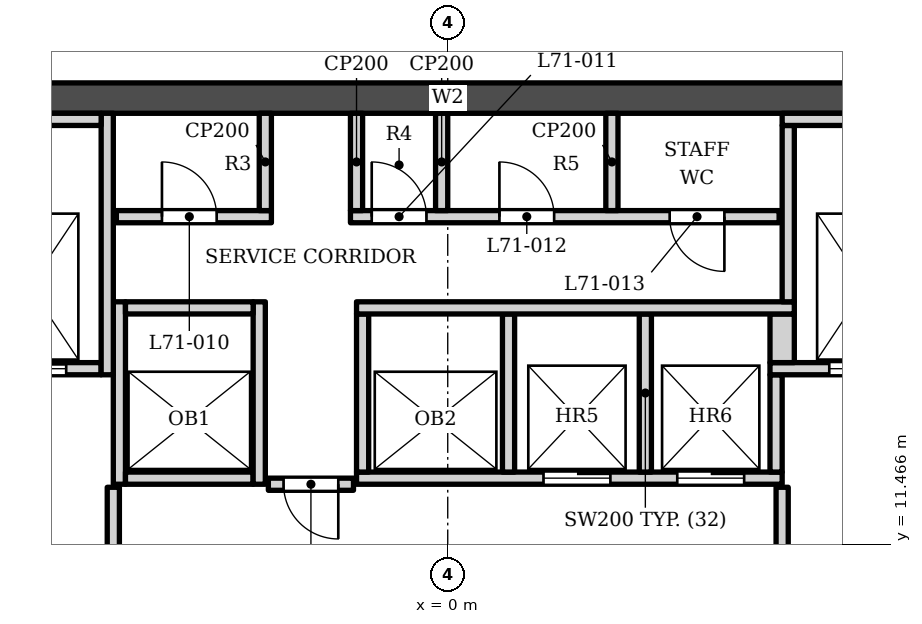
"""IFC4 building model, lengths in metres.
Left out: names, types, materials, properties, quantities, classifications, styles, units other than length and angle.
Written with IfcOpenShell. Run it as: python <this file> out.ifc"""

import sys

from ifc_helpers import new_model, si_unit, direction, frame, frame_2d, origin, place, context, subcontext, project, spatial, rectangle, extrude, element, fill, save


model = new_model("IFC4")
c1 = context("Model", 3, precision=1e-05, world=origin(), true_north=direction((0.0, 1.0)))
c2 = subcontext(c1, "Body", "Model", "MODEL_VIEW")
j1 = project(units=[si_unit("LENGTHUNIT", "METRE"), si_unit("PLANEANGLEUNIT", "RADIAN")], contexts=[c1])
p1 = place(None, origin())
s1 = spatial("IfcSite", under=j1, at=p1, CompositionType="ELEMENT")
p2 = place(p1, origin())
s2 = spatial("IfcBuilding", under=s1, at=p2, CompositionType="ELEMENT")
p3 = place(p2, frame((0.0, 0.0, 295.0)))
s3 = spatial("IfcBuildingStorey", under=s2, at=p3, CompositionType="ELEMENT", Elevation=295.0)
p4 = place(p3, frame((-12.1, 18.802, 0.0), z_axis=(0.0, 0.0, 1.0), x_axis=(1.0, 0.0, 0.0)))
e1 = element("IfcWall", 1, at=p4, inside=s3, PredefinedType="SHEAR", context=c2, shape_type="SweptSolid", body=[
    extrude(rectangle(XDim=24.2, YDim=0.5, at=frame_2d((12.1, 0.0))), origin(), (0.0, 0.0, 1.0), 7.5),
])
p5 = place(p3, frame((-5.5, 9.103, 0.0), z_axis=(0.0, 0.0, 1.0), x_axis=(0.0, 1.0, 0.0)))
e2 = element("IfcWall", 2, at=p5, inside=s3, PredefinedType="SOLIDWALL", context=c2, shape_type="SweptSolid", body=[
    extrude(rectangle(XDim=3.3, YDim=0.2, at=frame_2d((1.65, 0.0))), origin(), (0.0, 0.0, 1.0), 7.2),
])
p6 = place(p5, frame((0.85, 0.0, 0.0)))
e3 = element("IfcOpeningElement", 3, at=p6, cuts=e2, PredefinedType="OPENING", context=c2, shape_type="SweptSolid", body=[
    extrude(rectangle(XDim=1.4, YDim=2.1, at=frame_2d((0.7, 1.05))), frame((0.0, 0.11, 0.0), z_axis=(0.0, -1.0, 0.0), x_axis=(1.0, 0.0, 0.0)), (0.0, 0.0, 1.0), 0.22),
])
p7 = place(p3, frame((5.5, 9.103, 0.0), z_axis=(0.0, 0.0, 1.0), x_axis=(0.0, 1.0, 0.0)))
e4 = element("IfcWall", 4, at=p7, inside=s3, PredefinedType="SOLIDWALL", context=c2, shape_type="SweptSolid", body=[
    extrude(rectangle(XDim=3.3, YDim=0.2, at=frame_2d((1.65, 0.0))), origin(), (0.0, 0.0, 1.0), 7.2),
])
p8 = place(p7, frame((0.85, 0.0, 0.0)))
e5 = element("IfcOpeningElement", 5, at=p8, cuts=e4, PredefinedType="OPENING", context=c2, shape_type="SweptSolid", body=[
    extrude(rectangle(XDim=1.4, YDim=2.1, at=frame_2d((0.7, 1.05))), frame((0.0, 0.11, 0.0), z_axis=(0.0, -1.0, 0.0), x_axis=(1.0, 0.0, 0.0)), (0.0, 0.0, 1.0), 0.22),
])
p9 = place(p3, frame((-2.95, 12.453, 0.0), z_axis=(0.0, 0.0, 1.0), x_axis=(1.0, 0.0, 0.0)))
e6 = element("IfcWall", 6, at=p9, inside=s3, PredefinedType="SOLIDWALL", context=c2, shape_type="SweptSolid", body=[
    extrude(rectangle(XDim=1.4, YDim=0.2, at=frame_2d((0.7, 0.0))), origin(), (0.0, 0.0, 1.0), 7.2),
])
p10 = place(p9, frame((0.25, 0.0, 0.0)))
e7 = element("IfcOpeningElement", 7, at=p10, cuts=e6, PredefinedType="OPENING", context=c2, shape_type="SweptSolid", body=[
    extrude(rectangle(XDim=0.9, YDim=2.1, at=frame_2d((0.45, 1.05))), frame((0.0, 0.11, 0.0), z_axis=(0.0, -1.0, 0.0), x_axis=(1.0, 0.0, 0.0)), (0.0, 0.0, 1.0), 0.22),
])
p11 = place(p3, frame((-5.4, 12.453, 0.0), z_axis=(0.0, 0.0, 1.0), x_axis=(0.0, 1.0, 0.0)))
e8 = element("IfcWall", 8, at=p11, inside=s3, PredefinedType="SOLIDWALL", context=c2, shape_type="SweptSolid", body=[
    extrude(rectangle(XDim=3.0, YDim=0.2, at=frame_2d((1.5, 0.0))), origin(), (0.0, 0.0, 1.0), 7.2),
])
p12 = place(p3, frame((-5.3, 12.552, 0.0), z_axis=(0.0, 0.0, 1.0), x_axis=(1.0, 0.0, 0.0)))
e9 = element("IfcWall", 9, at=p12, inside=s3, PredefinedType="SOLIDWALL", context=c2, shape_type="SweptSolid", body=[
    extrude(rectangle(XDim=2.1, YDim=0.2, at=frame_2d((1.05, 0.0))), origin(), (0.0, 0.0, 1.0), 7.2),
])
p13 = place(p3, frame((-3.1, 12.453, 0.0), z_axis=(0.0, 0.0, 1.0), x_axis=(0.0, 1.0, 0.0)))
e10 = element("IfcWall", 10, at=p13, inside=s3, PredefinedType="SOLIDWALL", context=c2, shape_type="SweptSolid", body=[
    extrude(rectangle(XDim=3.0, YDim=0.2, at=frame_2d((1.5, 0.0))), origin(), (0.0, 0.0, 1.0), 7.2),
])
p14 = place(p3, frame((-1.5, 12.552, 0.0), z_axis=(0.0, 0.0, 1.0), x_axis=(1.0, 0.0, 0.0)))
e11 = element("IfcWall", 11, at=p14, inside=s3, PredefinedType="SOLIDWALL", context=c2, shape_type="SweptSolid", body=[
    extrude(rectangle(XDim=7.0, YDim=0.2, at=frame_2d((3.5, 0.0))), origin(), (0.0, 0.0, 1.0), 7.2),
])
p15 = place(p14, frame((3.075, 0.0, 0.0)))
e12 = element("IfcOpeningElement", 12, at=p15, cuts=e11, PredefinedType="OPENING", context=c2, shape_type="SweptSolid", body=[
    extrude(rectangle(XDim=1.1, YDim=2.1, at=frame_2d((0.55, 1.05))), frame((0.0, 0.11, 0.0), z_axis=(0.0, -1.0, 0.0), x_axis=(1.0, 0.0, 0.0)), (0.0, 0.0, 1.0), 0.22),
])
p16 = place(p14, frame((5.275, 0.0, 0.0)))
e13 = element("IfcOpeningElement", 13, at=p16, cuts=e11, PredefinedType="OPENING", context=c2, shape_type="SweptSolid", body=[
    extrude(rectangle(XDim=1.1, YDim=2.1, at=frame_2d((0.55, 1.05))), frame((0.0, 0.11, 0.0), z_axis=(0.0, -1.0, 0.0), x_axis=(1.0, 0.0, 0.0)), (0.0, 0.0, 1.0), 0.22),
])
for number, where, z_axis, x_axis in (
    (14, (-1.4, 12.653, 0.0), (0.0, 0.0, 1.0), (0.0, 1.0, 0.0)),
    (15, (1.0, 12.653, 0.0), (0.0, 0.0, 1.0), (0.0, 1.0, 0.0)),
    (16, (3.25, 12.653, 0.0), (0.0, 0.0, 1.0), (0.0, 1.0, 0.0)),
):
    element("IfcWall", number, at=place(p3, frame(where, z_axis=z_axis, x_axis=x_axis)), inside=s3, PredefinedType="SOLIDWALL", context=c2, shape_type="SweptSolid", body=[
        extrude(rectangle(XDim=2.6, YDim=0.2, at=frame_2d((1.3, 0.0))), origin(), (0.0, 0.0, 1.0), 7.2),
    ])
p17 = place(p3, frame((5.4, 12.653, 0.0), z_axis=(0.0, 0.0, 1.0), x_axis=(0.0, 1.0, 0.0)))
e17 = element("IfcWall", 17, at=p17, inside=s3, PredefinedType="SOLIDWALL", context=c2, shape_type="SweptSolid", body=[
    extrude(rectangle(XDim=1.6, YDim=0.2, at=frame_2d((0.8, 0.0))), origin(), (0.0, 0.0, 1.0), 7.2),
])
p18 = place(p3, frame((-8.05, 14.353, 0.0), z_axis=(0.0, 0.0, 1.0), x_axis=(1.0, 0.0, 0.0)))
e18 = element("IfcWall", 18, at=p18, inside=s3, PredefinedType="SOLIDWALL", context=c2, shape_type="SweptSolid", body=[
    extrude(rectangle(XDim=2.35, YDim=0.2, at=frame_2d((1.175, 0.0))), origin(), (0.0, 0.0, 1.0), 7.2),
])
p19 = place(p18, frame((0.575, 0.0, 0.0)))
e19 = element("IfcOpeningElement", 19, at=p19, cuts=e18, PredefinedType="OPENING", context=c2, shape_type="SweptSolid", body=[
    extrude(rectangle(XDim=1.2, YDim=2.1, at=frame_2d((0.6, 1.05))), frame((0.0, 0.11, 0.0), z_axis=(0.0, -1.0, 0.0), x_axis=(1.0, 0.0, 0.0)), (0.0, 0.0, 1.0), 0.22),
])
p20 = place(p3, frame((-5.6, 14.253, 0.0), z_axis=(0.0, 0.0, 1.0), x_axis=(0.0, 1.0, 0.0)))
e20 = element("IfcWall", 20, at=p20, inside=s3, PredefinedType="SOLIDWALL", context=c2, shape_type="SweptSolid", body=[
    extrude(rectangle(XDim=4.3, YDim=0.2, at=frame_2d((2.15, 0.0))), origin(), (0.0, 0.0, 1.0), 7.2),
])
p21 = place(p3, frame((5.3, 14.353, 0.0), z_axis=(0.0, 0.0, 1.0), x_axis=(1.0, 0.0, 0.0)))
e21 = element("IfcWall", 21, at=p21, inside=s3, PredefinedType="SOLIDWALL", context=c2, shape_type="SweptSolid", body=[
    extrude(rectangle(XDim=2.75, YDim=0.2, at=frame_2d((1.375, 0.0))), origin(), (0.0, 0.0, 1.0), 7.2),
])
p22 = place(p21, frame((0.975, 0.0, 0.0)))
e22 = element("IfcOpeningElement", 22, at=p22, cuts=e21, PredefinedType="OPENING", context=c2, shape_type="SweptSolid", body=[
    extrude(rectangle(XDim=1.2, YDim=2.1, at=frame_2d((0.6, 1.05))), frame((0.0, 0.11, 0.0), z_axis=(0.0, -1.0, 0.0), x_axis=(1.0, 0.0, 0.0)), (0.0, 0.0, 1.0), 0.22),
])
p23 = place(p3, frame((5.5, 14.453, 0.0), z_axis=(0.0, 0.0, 1.0), x_axis=(0.0, 1.0, 0.0)))
e23 = element("IfcWall", 23, at=p23, inside=s3, PredefinedType="SOLIDWALL", context=c2, shape_type="SweptSolid", body=[
    extrude(rectangle(XDim=0.8, YDim=0.4, at=frame_2d((0.4, 0.0))), origin(), (0.0, 0.0, 1.0), 7.2),
])
p24 = place(p3, frame((-5.3, 15.353, 0.0), z_axis=(0.0, 0.0, 1.0), x_axis=(1.0, 0.0, 0.0)))
e24 = element("IfcWall", 24, at=p24, inside=s3, PredefinedType="SOLIDWALL", context=c2, shape_type="SweptSolid", body=[
    extrude(rectangle(XDim=2.1, YDim=0.2, at=frame_2d((1.05, 0.0))), origin(), (0.0, 0.0, 1.0), 7.2),
])
p25 = place(p3, frame((-1.5, 15.353, 0.0), z_axis=(0.0, 0.0, 1.0), x_axis=(1.0, 0.0, 0.0)))
e25 = element("IfcWall", 25, at=p25, inside=s3, PredefinedType="SOLIDWALL", context=c2, shape_type="SweptSolid", body=[
    extrude(rectangle(XDim=7.2, YDim=0.2, at=frame_2d((3.6, 0.0))), origin(), (0.0, 0.0, 1.0), 7.2),
])
p26 = place(p3, frame((5.6, 15.453, 0.0), z_axis=(0.0, 0.0, 1.0), x_axis=(0.0, 1.0, 0.0)))
e26 = element("IfcWall", 26, at=p26, inside=s3, PredefinedType="SOLIDWALL", context=c2, shape_type="SweptSolid", body=[
    extrude(rectangle(XDim=2.9, YDim=0.2, at=frame_2d((1.45, 0.0))), origin(), (0.0, 0.0, 1.0), 7.2),
])
p27 = place(p3, frame((-5.45, 16.853, 0.0), z_axis=(0.0, 0.0, 1.0), x_axis=(1.0, 0.0, 0.0)))
e27 = element("IfcWall", 27, at=p27, inside=s3, PredefinedType="SOLIDWALL", context=c2, shape_type="SweptSolid", body=[
    extrude(rectangle(XDim=2.55, YDim=0.2, at=frame_2d((1.275, 0.0))), origin(), (0.0, 0.0, 1.0), 7.2),
])
p28 = place(p27, frame((0.75, 0.0, 0.0)))
e28 = element("IfcOpeningElement", 28, at=p28, cuts=e27, PredefinedType="OPENING", context=c2, shape_type="SweptSolid", body=[
    extrude(rectangle(XDim=0.9, YDim=2.1, at=frame_2d((0.45, 1.05))), frame((0.0, 0.11, 0.0), z_axis=(0.0, -1.0, 0.0), x_axis=(1.0, 0.0, 0.0)), (0.0, 0.0, 1.0), 0.22),
])
p29 = place(p3, frame((-1.6, 16.853, 0.0), z_axis=(0.0, 0.0, 1.0), x_axis=(1.0, 0.0, 0.0)))
e29 = element("IfcWall", 29, at=p29, inside=s3, PredefinedType="SOLIDWALL", context=c2, shape_type="SweptSolid", body=[
    extrude(rectangle(XDim=7.05, YDim=0.2, at=frame_2d((3.525, 0.0))), origin(), (0.0, 0.0, 1.0), 7.2),
])
p30 = place(p29, frame((0.35, 0.0, 0.0)))
e30 = element("IfcOpeningElement", 30, at=p30, cuts=e29, PredefinedType="OPENING", context=c2, shape_type="SweptSolid", body=[
    extrude(rectangle(XDim=0.9, YDim=2.1, at=frame_2d((0.45, 1.05))), frame((0.0, 0.11, 0.0), z_axis=(0.0, -1.0, 0.0), x_axis=(1.0, 0.0, 0.0)), (0.0, 0.0, 1.0), 0.22),
])
p31 = place(p29, frame((2.45, 0.0, 0.0)))
e31 = element("IfcOpeningElement", 31, at=p31, cuts=e29, PredefinedType="OPENING", context=c2, shape_type="SweptSolid", body=[
    extrude(rectangle(XDim=0.9, YDim=2.1, at=frame_2d((0.45, 1.05))), frame((0.0, 0.11, 0.0), z_axis=(0.0, -1.0, 0.0), x_axis=(1.0, 0.0, 0.0)), (0.0, 0.0, 1.0), 0.22),
])
p32 = place(p29, frame((5.25, 0.0, 0.0)))
e32 = element("IfcOpeningElement", 32, at=p32, cuts=e29, PredefinedType="OPENING", context=c2, shape_type="SweptSolid", body=[
    extrude(rectangle(XDim=0.9, YDim=2.1, at=frame_2d((0.45, 1.05))), frame((0.0, 0.11, 0.0), z_axis=(0.0, -1.0, 0.0), x_axis=(1.0, 0.0, 0.0)), (0.0, 0.0, 1.0), 0.22),
])
for number, where, z_axis, x_axis in (
    (33, (-3.0, 16.953, 0.0), (0.0, 0.0, 1.0), (0.0, 1.0, 0.0)),
    (34, (-1.5, 16.953, 0.0), (0.0, 0.0, 1.0), (0.0, 1.0, 0.0)),
    (35, (-0.1, 16.953, 0.0), (0.0, 0.0, 1.0), (0.0, 1.0, 0.0)),
    (36, (2.7, 16.953, 0.0), (0.0, 0.0, 1.0), (0.0, 1.0, 0.0)),
):
    element("IfcWall", number, at=place(p3, frame(where, z_axis=z_axis, x_axis=x_axis)), inside=s3, PredefinedType="PARTITIONING", context=c2, shape_type="SweptSolid", body=[
        extrude(rectangle(XDim=1.6, YDim=0.2, at=frame_2d((0.8, 0.0))), origin(), (0.0, 0.0, 1.0), 7.2),
    ])
p33 = place(p3, frame((-8.05, 18.453, 0.0), z_axis=(0.0, 0.0, 1.0), x_axis=(1.0, 0.0, 0.0)))
e37 = element("IfcWall", 37, at=p33, inside=s3, PredefinedType="SOLIDWALL", context=c2, shape_type="SweptSolid", body=[
    extrude(rectangle(XDim=2.35, YDim=0.2, at=frame_2d((1.175, 0.0))), origin(), (0.0, 0.0, 1.0), 7.2),
])
p34 = place(p3, frame((5.5, 18.453, 0.0), z_axis=(0.0, 0.0, 1.0), x_axis=(1.0, 0.0, 0.0)))
e38 = element("IfcWall", 38, at=p34, inside=s3, PredefinedType="SOLIDWALL", context=c2, shape_type="SweptSolid", body=[
    extrude(rectangle(XDim=2.55, YDim=0.2, at=frame_2d((1.275, 0.0))), origin(), (0.0, 0.0, 1.0), 7.2),
])
p35 = place(p15, origin())
e39 = element("IfcDoor", 39, at=p35, inside=s3, OperationType="DOUBLE_DOOR_SLIDING", PredefinedType="DOOR", context=c2, shape_type="SweptSolid", body=[
    extrude(rectangle(XDim=1.1, YDim=2.1, at=frame_2d((0.55, 1.05))), frame((0.0, 0.025, 0.0), z_axis=(0.0, -1.0, 0.0), x_axis=(1.0, 0.0, 0.0)), (0.0, 0.0, 1.0), 0.05),
])
fill(e12, e39)
p36 = place(p16, origin())
e40 = element("IfcDoor", 40, at=p36, inside=s3, OperationType="DOUBLE_DOOR_SLIDING", PredefinedType="DOOR", context=c2, shape_type="SweptSolid", body=[
    extrude(rectangle(XDim=1.1, YDim=2.1, at=frame_2d((0.55, 1.05))), frame((0.0, 0.025, 0.0), z_axis=(0.0, -1.0, 0.0), x_axis=(1.0, 0.0, 0.0)), (0.0, 0.0, 1.0), 0.05),
])
fill(e13, e40)
p37 = place(p19, origin())
e41 = element("IfcDoor", 41, at=p37, inside=s3, OperationType="DOUBLE_DOOR_SLIDING", PredefinedType="DOOR", context=c2, shape_type="SweptSolid", body=[
    extrude(rectangle(XDim=1.2, YDim=2.1, at=frame_2d((0.6, 1.05))), frame((0.0, 0.025, 0.0), z_axis=(0.0, -1.0, 0.0), x_axis=(1.0, 0.0, 0.0)), (0.0, 0.0, 1.0), 0.05),
])
fill(e19, e41)
p38 = place(p22, origin())
e42 = element("IfcDoor", 42, at=p38, inside=s3, OperationType="DOUBLE_DOOR_SLIDING", PredefinedType="DOOR", context=c2, shape_type="SweptSolid", body=[
    extrude(rectangle(XDim=1.2, YDim=2.1, at=frame_2d((0.6, 1.05))), frame((0.0, 0.025, 0.0), z_axis=(0.0, -1.0, 0.0), x_axis=(1.0, 0.0, 0.0)), (0.0, 0.0, 1.0), 0.05),
])
fill(e22, e42)
p39 = place(p10, origin())
e43 = element("IfcDoor", 43, at=p39, inside=s3, OperationType="SINGLE_SWING_RIGHT", PredefinedType="DOOR", context=c2, shape_type="SweptSolid", body=[
    extrude(rectangle(XDim=0.9, YDim=2.1, at=frame_2d((0.45, 1.05))), frame((0.0, 0.025, 0.0), z_axis=(0.0, -1.0, 0.0), x_axis=(1.0, 0.0, 0.0)), (0.0, 0.0, 1.0), 0.05),
])
fill(e7, e43)
p40 = place(p28, origin())
e44 = element("IfcDoor", 44, at=p40, inside=s3, OperationType="SINGLE_SWING_LEFT", PredefinedType="DOOR", context=c2, shape_type="SweptSolid", body=[
    extrude(rectangle(XDim=0.9, YDim=2.1, at=frame_2d((0.45, 1.05))), frame((0.0, 0.025, 0.0), z_axis=(0.0, -1.0, 0.0), x_axis=(1.0, 0.0, 0.0)), (0.0, 0.0, 1.0), 0.05),
])
fill(e28, e44)
p41 = place(p30, origin())
e45 = element("IfcDoor", 45, at=p41, inside=s3, OperationType="SINGLE_SWING_LEFT", PredefinedType="DOOR", context=c2, shape_type="SweptSolid", body=[
    extrude(rectangle(XDim=0.9, YDim=2.1, at=frame_2d((0.45, 1.05))), frame((0.0, 0.025, 0.0), z_axis=(0.0, -1.0, 0.0), x_axis=(1.0, 0.0, 0.0)), (0.0, 0.0, 1.0), 0.05),
])
fill(e30, e45)
p42 = place(p31, origin())
e46 = element("IfcDoor", 46, at=p42, inside=s3, OperationType="SINGLE_SWING_LEFT", PredefinedType="DOOR", context=c2, shape_type="SweptSolid", body=[
    extrude(rectangle(XDim=0.9, YDim=2.1, at=frame_2d((0.45, 1.05))), frame((0.0, 0.025, 0.0), z_axis=(0.0, -1.0, 0.0), x_axis=(1.0, 0.0, 0.0)), (0.0, 0.0, 1.0), 0.05),
])
fill(e31, e46)
p43 = place(p32, origin())
e47 = element("IfcDoor", 47, at=p43, inside=s3, OperationType="SINGLE_SWING_RIGHT", PredefinedType="DOOR", context=c2, shape_type="SweptSolid", body=[
    extrude(rectangle(XDim=0.9, YDim=2.1, at=frame_2d((0.45, 1.05))), frame((0.0, 0.025, 0.0), z_axis=(0.0, -1.0, 0.0), x_axis=(1.0, 0.0, 0.0)), (0.0, 0.0, 1.0), 0.05),
])
fill(e32, e47)
save(model, sys.argv[1])
